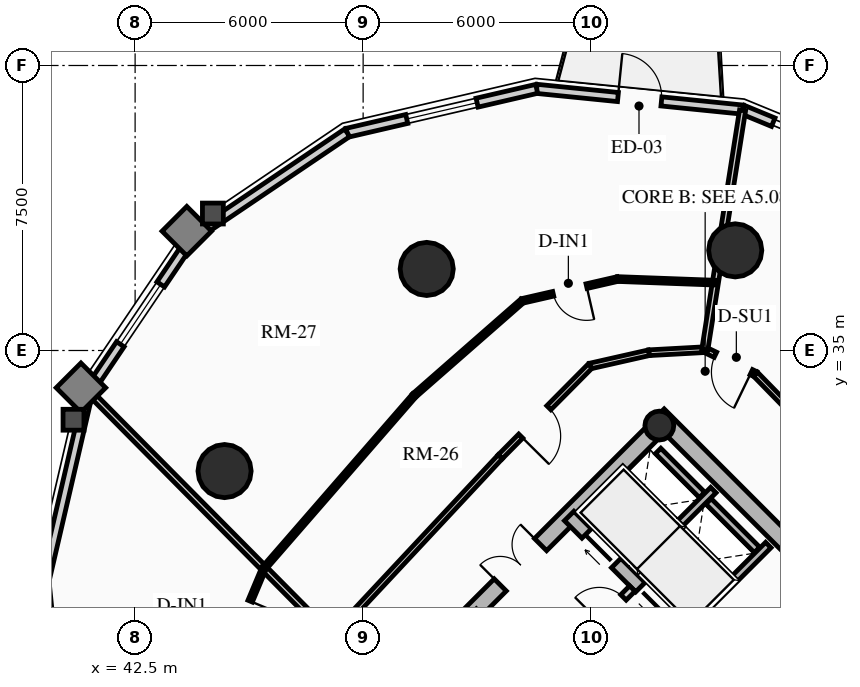
"""IFC4 building model, lengths in metres.
Left out: names, types, materials, properties, quantities, classifications, styles, units other than length and angle.
Written with IfcOpenShell. Run it as: python <this file> out.ifc"""

import sys

from ifc_helpers import new_model, si_unit, direction, frame, frame_2d, origin, origin_2d, place, context, subcontext, project, spatial, rectangle, circle, hollow_circle, extrude, source, transform, mapped, element, fill, save


model = new_model("IFC4")
c1 = context("Model", 3, precision=1e-05, world=origin(), true_north=direction((0.0, 1.0)))
c2 = subcontext(c1, "Body", "Model", "MODEL_VIEW")
j1 = project(units=[si_unit("LENGTHUNIT", "METRE"), si_unit("PLANEANGLEUNIT", "RADIAN")], contexts=[c1])
p1 = place(None, origin())
s1 = spatial("IfcSite", under=j1, at=p1, CompositionType="ELEMENT")
p2 = place(p1, origin())
s2 = spatial("IfcBuilding", under=s1, at=p2, CompositionType="ELEMENT")
p3 = place(p2, frame((0.0, 0.0, 93.43)))
s3 = spatial("IfcBuildingStorey", under=s2, at=p3, CompositionType="ELEMENT", Elevation=93.43)
p4 = place(p3, frame((66.303, 23.263, 0.0), z_axis=(0.0, 0.0, 1.0), x_axis=(-0.707106781187, 0.707106781187, 0.0)))
e1 = element("IfcWall", 1, at=p4, inside=s3, PredefinedType="SHEAR", context=c2, shape_type="SweptSolid", body=[
    extrude(rectangle(XDim=14.2, YDim=0.45, at=frame_2d((7.1, 0.0))), origin(), (0.0, 0.0, 1.0), 2.91),
])
p5 = place(p3, frame((48.856, 25.578, 0.0), z_axis=(0.0, 0.0, 1.0), x_axis=(0.707106781187, 0.707106781187, 0.0)))
e2 = element("IfcWall", 2, at=p5, inside=s3, PredefinedType="SHEAR", context=c2, shape_type="SweptSolid", body=[
    extrude(rectangle(XDim=10.7, YDim=0.45, at=frame_2d((5.35, 0.0))), origin(), (0.0, 0.0, 1.0), 2.91),
])
m1 = source(origin(), c2, "Body", "SweptSolid", [
    extrude(rectangle(XDim=1.5, YDim=2.02, at=frame_2d((0.75, 1.01))), frame((0.0, 0.235, 0.0), z_axis=(0.0, -1.0, 0.0), x_axis=(1.0, 0.0, 0.0)), (0.0, 0.0, 1.0), 0.47),
])
p6 = place(p5, frame((4.6, 0.0, 0.0)))
e3 = element("IfcOpeningElement", 3, at=p6, cuts=e2, PredefinedType="OPENING", context=c2, shape_type="MappedRepresentation", body=[
    mapped(m1, transform((0.0, 0.0, 0.0), x_axis=(1.0, 0.0, 0.0), y_axis=(0.0, 1.0, 0.0), z_axis=(0.0, 0.0, 1.0), scale=1.0)),
])
p7 = place(p3, frame((63.645, 20.922, 0.0), z_axis=(0.0, 0.0, 1.0), x_axis=(-0.707106781187, 0.707106781187, 0.0)))
e4 = element("IfcWall", 4, at=p7, inside=s3, PredefinedType="SHEAR", context=c2, shape_type="SweptSolid", body=[
    extrude(rectangle(XDim=13.75, YDim=0.35, at=frame_2d((6.875, 0.0))), origin(), (0.0, 0.0, 1.0), 2.91),
])
m2 = source(origin(), c2, "Body", "SweptSolid", [
    extrude(rectangle(XDim=1.1, YDim=2.015, at=frame_2d((0.55, 1.007))), frame((0.0, 0.185, 0.0), z_axis=(0.0, -1.0, 0.0), x_axis=(1.0, 0.0, 0.0)), (0.0, 0.0, 1.0), 0.37),
])
p8 = place(p7, frame((10.0, 0.0, 0.0)))
e5 = element("IfcOpeningElement", 5, at=p8, cuts=e4, PredefinedType="OPENING", context=c2, shape_type="MappedRepresentation", body=[
    mapped(m2, transform((0.0, 0.0, 0.0), x_axis=(1.0, 0.0, 0.0), y_axis=(0.0, 1.0, 0.0), z_axis=(0.0, 0.0, 1.0), scale=1.0)),
])
p9 = place(p7, frame((12.0, 0.0, 0.0)))
e6 = element("IfcOpeningElement", 6, at=p9, cuts=e4, PredefinedType="OPENING", context=c2, shape_type="MappedRepresentation", body=[
    mapped(m2, transform((0.0, 0.0, 0.0), x_axis=(1.0, 0.0, 0.0), y_axis=(0.0, 1.0, 0.0), z_axis=(0.0, 0.0, 1.0), scale=1.0)),
])
m3 = source(origin(), c2, "Body", "SweptSolid", [
    extrude(rectangle(XDim=1.15, YDim=2.02, at=frame_2d((0.575, 1.01))), frame((0.0, 0.185, 0.0), z_axis=(0.0, -1.0, 0.0), x_axis=(1.0, 0.0, 0.0)), (0.0, 0.0, 1.0), 0.37),
])
p10 = place(p7, frame((5.305, 0.0, 0.0)))
e7 = element("IfcOpeningElement", 7, at=p10, cuts=e4, PredefinedType="OPENING", context=c2, shape_type="MappedRepresentation", body=[
    mapped(m3, transform((0.0, 0.0, 0.0), x_axis=(1.0, 0.0, 0.0), y_axis=(0.0, 1.0, 0.0), z_axis=(0.0, 0.0, 1.0), scale=1.0)),
])
p11 = place(p3, frame((56.294, 33.024, 0.0), z_axis=(0.0, 0.0, 1.0), x_axis=(0.707106781187, 0.707106781187, 0.0)))
e8 = element("IfcColumn", 8, at=p11, inside=s3, PredefinedType="COLUMN", context=c2, shape_type="SweptSolid", body=[
    extrude(hollow_circle(Radius=0.38, WallThickness=0.032, at=origin_2d()), origin(), (0.0, 0.0, 1.0), 2.91),
])
for number, where, z_axis, x_axis in (
    (9, (58.291, 37.635, 0.0), (0.0, 0.0, 1.0), (1.0, 0.0, 0.0)),
    (10, (50.173, 37.146, 0.0), (0.0, 0.0, 1.0), (1.0, 0.0, 0.0)),
    (11, (44.854, 31.827, 0.0), (0.0, 0.0, 1.0), (1.0, 0.0, 0.0)),
):
    element("IfcColumn", number, at=place(p3, frame(where, z_axis=z_axis, x_axis=x_axis)), inside=s3, PredefinedType="USERDEFINED", context=c2, shape_type="SweptSolid", body=[
        extrude(circle(Radius=0.7, at=origin_2d()), origin(), (0.0, 0.0, 1.0), 2.91),
    ])
p12 = place(p3, frame((58.487, 41.339, 0.0), z_axis=(0.0, 0.0, 1.0), x_axis=(0.924556017656, -0.381046152345, 0.0)))
e12 = element("IfcWall", 12, at=p12, inside=s3, PredefinedType="SOLIDWALL", context=c2, shape_type="SweptSolid", body=[
    extrude(rectangle(XDim=0.87, YDim=0.24, at=frame_2d((0.435, 0.0))), origin(), (0.0, 0.0, 1.0), 2.179),
])
p13 = place(p3, frame((53.067, 41.885, 0.0), z_axis=(0.0, 0.0, 1.0), x_axis=(0.994971754311, -0.10015591906, 0.0)))
e13 = element("IfcWall", 13, at=p13, inside=s3, PredefinedType="SOLIDWALL", context=c2, shape_type="SweptSolid", body=[
    extrude(rectangle(XDim=5.448, YDim=0.24, at=frame_2d((2.724, 0.0))), origin(), (0.0, 0.0, 1.0), 2.179),
])
m4 = source(origin(), c2, "Body", "SweptSolid", [
    extrude(rectangle(XDim=1.15, YDim=2.005, at=frame_2d((0.575, 1.002))), frame((0.0, 0.13, 0.0), z_axis=(0.0, -1.0, 0.0), x_axis=(1.0, 0.0, 0.0)), (0.0, 0.0, 1.0), 0.26),
])
p14 = place(p13, frame((2.149, 0.0, 0.0)))
e14 = element("IfcOpeningElement", 14, at=p14, cuts=e13, PredefinedType="OPENING", context=c2, shape_type="MappedRepresentation", body=[
    mapped(m4, transform((0.0, 0.0, 0.0), x_axis=(1.0, 0.0, 0.0), y_axis=(0.0, 1.0, 0.0), z_axis=(0.0, 0.0, 1.0), scale=1.0)),
])
p15 = place(p3, frame((48.08, 40.729, 0.0), z_axis=(0.0, 0.0, 1.0), x_axis=(0.974165631126, 0.225834725257, 0.0)))
e15 = element("IfcWall", 15, at=p15, inside=s3, PredefinedType="SOLIDWALL", context=c2, shape_type="SweptSolid", body=[
    extrude(rectangle(XDim=5.119, YDim=0.24, at=frame_2d((2.56, 0.0))), origin(), (0.0, 0.0, 1.0), 2.179),
])
m5 = source(origin(), c2, "Body", "SweptSolid", [
    extrude(rectangle(XDim=1.9, YDim=1.35, at=frame_2d((0.95, 0.675))), frame((0.0, 0.13, 0.0), z_axis=(0.0, -1.0, 0.0), x_axis=(1.0, 0.0, 0.0)), (0.0, 0.0, 1.0), 0.26),
])
p16 = place(p15, frame((1.609, 0.0, 0.65)))
e16 = element("IfcOpeningElement", 16, at=p16, cuts=e15, PredefinedType="OPENING", context=c2, shape_type="MappedRepresentation", body=[
    mapped(m5, transform((0.0, 0.0, 0.0), x_axis=(1.0, 0.0, 0.0), y_axis=(0.0, 1.0, 0.0), z_axis=(0.0, 0.0, 1.0), scale=1.0)),
])
p17 = place(p3, frame((44.015, 37.985, 0.0), z_axis=(0.0, 0.0, 1.0), x_axis=(0.828781148131, 0.559572880421, 0.0)))
e17 = element("IfcWall", 17, at=p17, inside=s3, PredefinedType="SOLIDWALL", context=c2, shape_type="SweptSolid", body=[
    extrude(rectangle(XDim=4.905, YDim=0.24, at=frame_2d((2.452, 0.0))), origin(), (0.0, 0.0, 1.0), 2.179),
])
p18 = place(p3, frame((41.271, 33.92, 0.0), z_axis=(0.0, 0.0, 1.0), x_axis=(0.559572880421, 0.828781148131, 0.0)))
e18 = element("IfcWall", 18, at=p18, inside=s3, PredefinedType="SOLIDWALL", context=c2, shape_type="SweptSolid", body=[
    extrude(rectangle(XDim=4.905, YDim=0.24, at=frame_2d((2.452, 0.0))), origin(), (0.0, 0.0, 1.0), 2.179),
])
p19 = place(p18, frame((1.502, 0.0, 0.65)))
e19 = element("IfcOpeningElement", 19, at=p19, cuts=e18, PredefinedType="OPENING", context=c2, shape_type="MappedRepresentation", body=[
    mapped(m5, transform((0.0, 0.0, 0.0), x_axis=(1.0, 0.0, 0.0), y_axis=(0.0, 1.0, 0.0), z_axis=(0.0, 0.0, 1.0), scale=1.0)),
])
p20 = place(p3, frame((40.115, 28.933, 0.0), z_axis=(0.0, 0.0, 1.0), x_axis=(0.225834725257, 0.974165631126, 0.0)))
e20 = element("IfcWall", 20, at=p20, inside=s3, PredefinedType="SOLIDWALL", context=c2, shape_type="SweptSolid", body=[
    extrude(rectangle(XDim=5.119, YDim=0.24, at=frame_2d((2.56, 0.0))), origin(), (0.0, 0.0, 1.0), 2.179),
])
p21 = place(p3, frame((40.661, 23.513, 0.0), z_axis=(0.0, 0.0, 1.0), x_axis=(-0.10015591906, 0.994971754311, 0.0)))
e21 = element("IfcWall", 21, at=p21, inside=s3, PredefinedType="SOLIDWALL", context=c2, shape_type="SweptSolid", body=[
    extrude(rectangle(XDim=5.448, YDim=0.24, at=frame_2d((2.724, 0.0))), origin(), (0.0, 0.0, 1.0), 2.179),
])
m6 = source(origin(), c2, "Body", "SweptSolid", [
    extrude(rectangle(XDim=2.2, YDim=1.35, at=frame_2d((1.1, 0.675))), frame((0.0, 0.13, 0.0), z_axis=(0.0, -1.0, 0.0), x_axis=(1.0, 0.0, 0.0)), (0.0, 0.0, 1.0), 0.26),
])
p22 = place(p21, frame((1.624, 0.0, 0.65)))
e22 = element("IfcOpeningElement", 22, at=p22, cuts=e21, PredefinedType="OPENING", context=c2, shape_type="MappedRepresentation", body=[
    mapped(m6, transform((0.0, 0.0, 0.0), x_axis=(1.0, 0.0, 0.0), y_axis=(0.0, 1.0, 0.0), z_axis=(0.0, 0.0, 1.0), scale=1.0)),
])
p23 = place(p3, frame((57.062, 27.781, 0.0), z_axis=(0.0, 0.0, 1.0), x_axis=(0.707106781187, 0.707106781187, 0.0)))
e23 = element("IfcWall", 23, at=p23, inside=s3, PredefinedType="SHEAR", context=c2, shape_type="SweptSolid", body=[
    extrude(rectangle(XDim=2.97, YDim=0.2, at=frame_2d((1.485, 0.0))), origin(), (0.0, 0.0, 1.0), 2.91),
])
p24 = place(p3, frame((55.615, 29.227, 0.0), z_axis=(0.0, 0.0, 1.0), x_axis=(0.707147878904, 0.70706568108, 0.0)))
e24 = element("IfcWall", 24, at=p24, inside=s3, PredefinedType="SHEAR", context=c2, shape_type="SweptSolid", body=[
    extrude(rectangle(XDim=2.97, YDim=0.2, at=frame_2d((1.485, 0.0))), origin(), (0.0, 0.0, 1.0), 2.91),
])
p25 = place(p3, frame((58.865, 29.754, 0.0), z_axis=(0.0, 0.0, 1.0), x_axis=(-0.707174411312, 0.707039144592, 0.0)))
e25 = element("IfcWall", 25, at=p25, inside=s3, PredefinedType="SHEAR", context=c2, shape_type="SweptSolid", body=[
    extrude(rectangle(XDim=1.805, YDim=0.2, at=frame_2d((0.902, 0.0))), origin(), (0.0, 0.0, 1.0), 2.91),
])
p26 = place(p3, frame((57.419, 31.2, 0.0), z_axis=(0.0, 0.0, 1.0), x_axis=(-0.707032117043, 0.707181437447, 0.0)))
e26 = element("IfcWall", 26, at=p26, inside=s3, PredefinedType="SHEAR", context=c2, shape_type="SweptSolid", body=[
    extrude(rectangle(XDim=1.635, YDim=0.2, at=frame_2d((0.817, 0.0))), origin(), (0.0, 0.0, 1.0), 2.91),
])
p27 = place(p3, frame((53.264, 26.416, 0.0), z_axis=(0.0, 0.0, 1.0), x_axis=(0.707106781187, 0.707106781187, 0.0)))
e27 = element("IfcWall", 27, at=p27, inside=s3, PredefinedType="PARTITIONING", context=c2, shape_type="SweptSolid", body=[
    extrude(rectangle(XDim=3.28, YDim=0.2, at=frame_2d((1.64, 0.0))), origin(), (0.0, 0.0, 1.0), 2.655),
])
m7 = source(origin(), c2, "Body", "SweptSolid", [
    extrude(rectangle(XDim=1.0, YDim=2.015, at=frame_2d((0.5, 1.007))), frame((0.0, 0.11, 0.0), z_axis=(0.0, -1.0, 0.0), x_axis=(1.0, 0.0, 0.0)), (0.0, 0.0, 1.0), 0.22),
])
p28 = place(p27, frame((0.14, 0.0, 0.0)))
e28 = element("IfcOpeningElement", 28, at=p28, cuts=e27, PredefinedType="OPENING", context=c2, shape_type="MappedRepresentation", body=[
    mapped(m7, transform((0.0, 0.0, 0.0), x_axis=(1.0, 0.0, 0.0), y_axis=(0.0, 1.0, 0.0), z_axis=(0.0, 0.0, 1.0), scale=1.0)),
])
m8 = source(origin(), c2, "Body", "SweptSolid", [
    extrude(rectangle(XDim=0.9, YDim=2.005, at=frame_2d((0.45, 1.002))), frame((0.0, 0.11, 0.0), z_axis=(0.0, -1.0, 0.0), x_axis=(1.0, 0.0, 0.0)), (0.0, 0.0, 1.0), 0.22),
])
p29 = place(p27, frame((2.05, 0.0, 0.0)))
e29 = element("IfcOpeningElement", 29, at=p29, cuts=e27, PredefinedType="OPENING", context=c2, shape_type="MappedRepresentation", body=[
    mapped(m8, transform((0.0, 0.0, 0.0), x_axis=(1.0, 0.0, 0.0), y_axis=(0.0, 1.0, 0.0), z_axis=(0.0, 0.0, 1.0), scale=1.0)),
])
p30 = place(p3, frame((63.051, 30.051, 0.0), z_axis=(0.0, 0.0, 1.0), x_axis=(-0.698846622234, 0.715271555839, 0.0)))
e30 = element("IfcWall", 30, at=p30, inside=s3, PredefinedType="PARTITIONING", context=c2, shape_type="SweptSolid", body=[
    extrude(rectangle(XDim=6.05, YDim=0.15, at=frame_2d((3.025, 0.0))), origin(), (0.0, 0.0, 1.0), 2.225),
])
p31 = place(p3, frame((58.823, 34.378, 0.0), z_axis=(0.0, 0.0, 1.0), x_axis=(-0.900449137666, 0.434961320668, 0.0)))
e31 = element("IfcWall", 31, at=p31, inside=s3, PredefinedType="PARTITIONING", context=c2, shape_type="SweptSolid", body=[
    extrude(rectangle(XDim=1.479, YDim=0.15, at=frame_2d((0.74, 0.0))), origin(), (0.0, 0.0, 1.0), 2.225),
])
m9 = source(origin(), c2, "Body", "SweptSolid", [
    extrude(rectangle(XDim=1.05, YDim=2.015, at=frame_2d((0.525, 1.007))), frame((0.0, 0.085, 0.0), z_axis=(0.0, -1.0, 0.0), x_axis=(1.0, 0.0, 0.0)), (0.0, 0.0, 1.0), 0.17),
])
p32 = place(p31, frame((0.12, 0.0, 0.0)))
e32 = element("IfcOpeningElement", 32, at=p32, cuts=e31, PredefinedType="OPENING", context=c2, shape_type="MappedRepresentation", body=[
    mapped(m9, transform((0.0, 0.0, 0.0), x_axis=(1.0, 0.0, 0.0), y_axis=(0.0, 1.0, 0.0), z_axis=(0.0, 0.0, 1.0), scale=1.0)),
])
p33 = place(p3, frame((57.491, 35.021, 0.0), z_axis=(0.0, 0.0, 1.0), x_axis=(-0.9985194771, -0.054395347698, 0.0)))
e33 = element("IfcWall", 33, at=p33, inside=s3, PredefinedType="PARTITIONING", context=c2, shape_type="SweptSolid", body=[
    extrude(rectangle(XDim=1.472, YDim=0.15, at=frame_2d((0.736, 0.0))), origin(), (0.0, 0.0, 1.0), 2.225),
])
p34 = place(p3, frame((56.021, 34.941, 0.0), z_axis=(0.0, 0.0, 1.0), x_axis=(-0.975309543901, -0.220842236847, 0.0)))
e34 = element("IfcWall", 34, at=p34, inside=s3, PredefinedType="PARTITIONING", context=c2, shape_type="SweptSolid", body=[
    extrude(rectangle(XDim=1.585, YDim=0.15, at=frame_2d((0.792, 0.0))), origin(), (0.0, 0.0, 1.0), 2.225),
])
p35 = place(p3, frame((54.475, 34.591, 0.0), z_axis=(0.0, 0.0, 1.0), x_axis=(-0.703869646439, -0.710329163714, 0.0)))
e35 = element("IfcWall", 35, at=p35, inside=s3, PredefinedType="PARTITIONING", context=c2, shape_type="SweptSolid", body=[
    extrude(rectangle(XDim=3.364, YDim=0.15, at=frame_2d((1.682, 0.0))), origin(), (0.0, 0.0, 1.0), 2.225),
])
p36 = place(p35, frame((1.546, 0.0, 0.0)))
e36 = element("IfcOpeningElement", 36, at=p36, cuts=e35, PredefinedType="OPENING", context=c2, shape_type="MappedRepresentation", body=[
    mapped(m9, transform((0.0, 0.0, 0.0), x_axis=(1.0, 0.0, 0.0), y_axis=(0.0, 1.0, 0.0), z_axis=(0.0, 0.0, 1.0), scale=1.0)),
])
p37 = place(p3, frame((52.107, 32.202, 0.0), z_axis=(0.0, 0.0, 1.0), x_axis=(-0.682605209028, -0.730787334734, 0.0)))
e37 = element("IfcWall", 37, at=p37, inside=s3, PredefinedType="PARTITIONING", context=c2, shape_type="SweptSolid", body=[
    extrude(rectangle(XDim=6.486, YDim=0.15, at=frame_2d((3.243, 0.0))), origin(), (0.0, 0.0, 1.0), 2.225),
])
p38 = place(p3, frame((57.491, 35.021, 0.0), z_axis=(0.0, 0.0, 1.0), x_axis=(0.155805268746, 0.98778779008, 0.0)))
e38 = element("IfcWall", 38, at=p38, inside=s3, PredefinedType="PARTITIONING", context=c2, shape_type="SweptSolid", body=[
    extrude(rectangle(XDim=6.376, YDim=0.16, at=frame_2d((3.188, 0.0))), origin(), (0.0, 0.0, 1.0), 2.179),
])
p39 = place(p3, frame((47.68, 27.462, 0.0), z_axis=(0.0, 0.0, 1.0), x_axis=(-0.703913074907, 0.710286127539, 0.0)))
e39 = element("IfcWall", 39, at=p39, inside=s3, PredefinedType="PARTITIONING", context=c2, shape_type="SweptSolid", body=[
    extrude(rectangle(XDim=9.079, YDim=0.16, at=frame_2d((4.54, 0.0))), origin(), (0.0, 0.0, 1.0), 2.179),
])
p40 = place(p3, frame((57.769, 36.785, 0.0), z_axis=(0.0, 0.0, 1.0), x_axis=(-0.999316779648, 0.036959084311, 0.0)))
e40 = element("IfcWall", 40, at=p40, inside=s3, PredefinedType="PARTITIONING", context=c2, shape_type="SweptSolid", body=[
    extrude(rectangle(XDim=2.576, YDim=0.125, at=frame_2d((1.288, 0.0))), origin(), (0.0, 0.0, 1.0), 2.655),
])
p41 = place(p3, frame((55.194, 36.88, 0.0), z_axis=(0.0, 0.0, 1.0), x_axis=(-0.97469098149, -0.22355645954, 0.0)))
e41 = element("IfcWall", 41, at=p41, inside=s3, PredefinedType="PARTITIONING", context=c2, shape_type="SweptSolid", body=[
    extrude(rectangle(XDim=2.573, YDim=0.125, at=frame_2d((1.287, 0.0))), origin(), (0.0, 0.0, 1.0), 2.225),
])
m10 = source(origin(), c2, "Body", "SweptSolid", [
    extrude(rectangle(XDim=0.9, YDim=2.005, at=frame_2d((0.45, 1.002))), frame((0.0, 0.073, 0.0), z_axis=(0.0, -1.0, 0.0), x_axis=(1.0, 0.0, 0.0)), (0.0, 0.0, 1.0), 0.145),
])
p42 = place(p41, frame((0.836, 0.0, 0.0)))
e42 = element("IfcOpeningElement", 42, at=p42, cuts=e41, PredefinedType="OPENING", context=c2, shape_type="MappedRepresentation", body=[
    mapped(m10, transform((0.0, 0.0, 0.0), x_axis=(1.0, 0.0, 0.0), y_axis=(0.0, 1.0, 0.0), z_axis=(0.0, 0.0, 1.0), scale=1.0)),
])
p43 = place(p3, frame((52.687, 36.305, 0.0), z_axis=(0.0, 0.0, 1.0), x_axis=(-0.752332345919, -0.658783759123, 0.0)))
e43 = element("IfcWall", 43, at=p43, inside=s3, PredefinedType="PARTITIONING", context=c2, shape_type="SweptSolid", body=[
    extrude(rectangle(XDim=3.776, YDim=0.125, at=frame_2d((1.888, 0.0))), origin(), (0.0, 0.0, 1.0), 2.225),
])
p44 = place(p3, frame((49.845, 33.817, 0.0), z_axis=(0.0, 0.0, 1.0), x_axis=(-0.656101508867, -0.754672650931, 0.0)))
e44 = element("IfcWall", 44, at=p44, inside=s3, PredefinedType="PARTITIONING", context=c2, shape_type="SweptSolid", body=[
    extrude(rectangle(XDim=6.029, YDim=0.125, at=frame_2d((3.014, 0.0))), origin(), (0.0, 0.0, 1.0), 2.225),
])
p45 = place(p3, frame((45.89, 29.268, 0.0), z_axis=(0.0, 0.0, 1.0), x_axis=(-0.387057419757, -0.922055613188, 0.0)))
e45 = element("IfcWall", 45, at=p45, inside=s3, PredefinedType="PARTITIONING", context=c2, shape_type="SweptSolid", body=[
    extrude(rectangle(XDim=2.774, YDim=0.125, at=frame_2d((1.387, 0.0))), origin(), (0.0, 0.0, 1.0), 2.225),
])
p46 = place(p45, frame((0.937, 0.0, 0.0)))
e46 = element("IfcOpeningElement", 46, at=p46, cuts=e45, PredefinedType="OPENING", context=c2, shape_type="MappedRepresentation", body=[
    mapped(m10, transform((0.0, 0.0, 0.0), x_axis=(1.0, 0.0, 0.0), y_axis=(0.0, 1.0, 0.0), z_axis=(0.0, 0.0, 1.0), scale=1.0)),
])
m11 = source(origin(), c2, "Body", "SweptSolid", [
    extrude(rectangle(XDim=1.15, YDim=2.005, at=frame_2d((0.575, 1.002))), frame((0.0, 0.025, 0.0), z_axis=(0.0, -1.0, 0.0), x_axis=(1.0, 0.0, 0.0)), (0.0, 0.0, 1.0), 0.05),
])
p47 = place(p14, origin())
e47 = element("IfcDoor", 47, at=p47, inside=s3, OperationType="SINGLE_SWING_LEFT", PredefinedType="DOOR", context=c2, shape_type="MappedRepresentation", body=[
    mapped(m11, transform((0.0, 0.0, 0.0), x_axis=(1.0, 0.0, 0.0), y_axis=(0.0, 1.0, 0.0), z_axis=(0.0, 0.0, 1.0), scale=1.0)),
])
fill(e14, e47)
m12 = source(origin(), c2, "Body", "SweptSolid", [
    extrude(rectangle(XDim=1.9, YDim=1.35, at=frame_2d((0.95, 0.675))), frame((0.0, 0.03, 0.0), z_axis=(0.0, -1.0, 0.0), x_axis=(1.0, 0.0, 0.0)), (0.0, 0.0, 1.0), 0.06),
])
p48 = place(p16, origin())
e48 = element("IfcWindow", 48, at=p48, inside=s3, PartitioningType="DOUBLE_PANEL_VERTICAL", PredefinedType="WINDOW", context=c2, shape_type="MappedRepresentation", body=[
    mapped(m12, transform((0.0, 0.0, 0.0), x_axis=(1.0, 0.0, 0.0), y_axis=(0.0, 1.0, 0.0), z_axis=(0.0, 0.0, 1.0), scale=1.0)),
])
fill(e16, e48)
p49 = place(p19, origin())
e49 = element("IfcWindow", 49, at=p49, inside=s3, PartitioningType="DOUBLE_PANEL_VERTICAL", PredefinedType="WINDOW", context=c2, shape_type="MappedRepresentation", body=[
    mapped(m12, transform((0.0, 0.0, 0.0), x_axis=(1.0, 0.0, 0.0), y_axis=(0.0, 1.0, 0.0), z_axis=(0.0, 0.0, 1.0), scale=1.0)),
])
fill(e19, e49)
m13 = source(origin(), c2, "Body", "SweptSolid", [
    extrude(rectangle(XDim=1.1, YDim=2.015, at=frame_2d((0.55, 1.007))), frame((0.0, 0.025, 0.0), z_axis=(0.0, -1.0, 0.0), x_axis=(1.0, 0.0, 0.0)), (0.0, 0.0, 1.0), 0.05),
])
p50 = place(p8, origin())
e50 = element("IfcDoor", 50, at=p50, inside=s3, OperationType="SLIDING_TO_LEFT", PredefinedType="DOOR", context=c2, shape_type="MappedRepresentation", body=[
    mapped(m13, transform((0.0, 0.0, 0.0), x_axis=(1.0, 0.0, 0.0), y_axis=(0.0, 1.0, 0.0), z_axis=(0.0, 0.0, 1.0), scale=1.0)),
])
fill(e5, e50)
p51 = place(p9, origin())
e51 = element("IfcDoor", 51, at=p51, inside=s3, OperationType="SLIDING_TO_RIGHT", PredefinedType="DOOR", context=c2, shape_type="MappedRepresentation", body=[
    mapped(m13, transform((0.0, 0.0, 0.0), x_axis=(1.0, 0.0, 0.0), y_axis=(0.0, 1.0, 0.0), z_axis=(0.0, 0.0, 1.0), scale=1.0)),
])
fill(e6, e51)
m14 = source(origin(), c2, "Body", "SweptSolid", [
    extrude(rectangle(XDim=1.5, YDim=2.02, at=frame_2d((0.75, 1.01))), frame((0.0, 0.025, 0.0), z_axis=(0.0, -1.0, 0.0), x_axis=(1.0, 0.0, 0.0)), (0.0, 0.0, 1.0), 0.05),
])
p52 = place(p6, origin())
e52 = element("IfcDoor", 52, at=p52, inside=s3, OperationType="DOUBLE_DOOR_SINGLE_SWING", PredefinedType="DOOR", context=c2, shape_type="MappedRepresentation", body=[
    mapped(m14, transform((0.0, 0.0, 0.0), x_axis=(1.0, 0.0, 0.0), y_axis=(0.0, 1.0, 0.0), z_axis=(0.0, 0.0, 1.0), scale=1.0)),
])
fill(e3, e52)
m15 = source(origin(), c2, "Body", "SweptSolid", [
    extrude(rectangle(XDim=0.9, YDim=2.005, at=frame_2d((0.45, 1.002))), frame((0.0, 0.025, 0.0), z_axis=(0.0, -1.0, 0.0), x_axis=(1.0, 0.0, 0.0)), (0.0, 0.0, 1.0), 0.05),
])
p53 = place(p29, origin())
e53 = element("IfcDoor", 53, at=p53, inside=s3, OperationType="SINGLE_SWING_LEFT", PredefinedType="DOOR", context=c2, shape_type="MappedRepresentation", body=[
    mapped(m15, transform((0.0, 0.0, 0.0), x_axis=(1.0, 0.0, 0.0), y_axis=(0.0, 1.0, 0.0), z_axis=(0.0, 0.0, 1.0), scale=1.0)),
])
fill(e29, e53)
m16 = source(origin(), c2, "Body", "SweptSolid", [
    extrude(rectangle(XDim=1.05, YDim=2.015, at=frame_2d((0.525, 1.007))), frame((0.0, 0.025, 0.0), z_axis=(0.0, -1.0, 0.0), x_axis=(1.0, 0.0, 0.0)), (0.0, 0.0, 1.0), 0.05),
])
p54 = place(p36, origin())
e54 = element("IfcDoor", 54, at=p54, inside=s3, OperationType="SINGLE_SWING_RIGHT", PredefinedType="DOOR", context=c2, shape_type="MappedRepresentation", body=[
    mapped(m16, transform((0.0, 0.0, 0.0), x_axis=(1.0, 0.0, 0.0), y_axis=(0.0, 1.0, 0.0), z_axis=(0.0, 0.0, 1.0), scale=1.0)),
])
fill(e36, e54)
p55 = place(p42, origin())
e55 = element("IfcDoor", 55, at=p55, inside=s3, OperationType="SINGLE_SWING_LEFT", PredefinedType="DOOR", context=c2, shape_type="MappedRepresentation", body=[
    mapped(m15, transform((0.0, 0.0, 0.0), x_axis=(1.0, 0.0, 0.0), y_axis=(0.0, 1.0, 0.0), z_axis=(0.0, 0.0, 1.0), scale=1.0)),
])
fill(e42, e55)
p56 = place(p46, origin())
e56 = element("IfcDoor", 56, at=p56, inside=s3, OperationType="SINGLE_SWING_LEFT", PredefinedType="DOOR", context=c2, shape_type="MappedRepresentation", body=[
    mapped(m15, transform((0.0, 0.0, 0.0), x_axis=(1.0, 0.0, 0.0), y_axis=(0.0, 1.0, 0.0), z_axis=(0.0, 0.0, 1.0), scale=1.0)),
])
fill(e46, e56)
p57 = place(p32, origin())
e57 = element("IfcDoor", 57, at=p57, inside=s3, OperationType="SINGLE_SWING_LEFT", PredefinedType="DOOR", context=c2, shape_type="MappedRepresentation", body=[
    mapped(m16, transform((0.0, 0.0, 0.0), x_axis=(1.0, 0.0, 0.0), y_axis=(0.0, 1.0, 0.0), z_axis=(0.0, 0.0, 1.0), scale=1.0)),
])
fill(e32, e57)
save(model, sys.argv[1])
